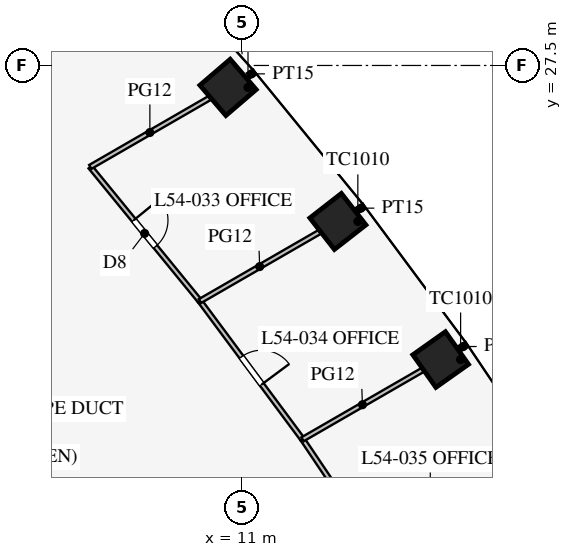
"""IFC4 building model, lengths in metres.
Left out: names, types, materials, properties, quantities, classifications, styles, units other than length and angle.
Written with IfcOpenShell. Run it as: python <this file> out.ifc"""

import sys

from ifc_helpers import new_model, si_unit, direction, frame, frame_2d, origin, origin_2d, place, context, subcontext, project, spatial, rectangle, extrude, element, fill, save


model = new_model("IFC4")
c1 = context("Model", 3, precision=1e-05, world=origin(), true_north=direction((0.0, 1.0)))
c2 = subcontext(c1, "Body", "Model", "MODEL_VIEW")
j1 = project(units=[si_unit("LENGTHUNIT", "METRE"), si_unit("PLANEANGLEUNIT", "RADIAN")], contexts=[c1])
p1 = place(None, origin())
s1 = spatial("IfcSite", under=j1, at=p1, CompositionType="ELEMENT")
p2 = place(p1, origin())
s2 = spatial("IfcBuilding", under=s1, at=p2, CompositionType="ELEMENT")
p3 = place(p2, frame((0.0, 0.0, 235.9)))
s3 = spatial("IfcBuildingStorey", under=s2, at=p3, CompositionType="ELEMENT", Elevation=235.9)
for number, where, z_axis, x_axis in (
    (1, (16.227, 19.761, 0.0), (0.0, 0.0, 1.0), (-0.577, 0.816, 0.0)),
    (2, (13.522, 23.396, 0.0), (0.0, 0.0, 1.0), (-0.615, 0.789, 0.0)),
    (3, (10.632, 26.923, 0.0), (0.0, 0.0, 1.0), (-0.651, 0.759, 0.0)),
):
    element("IfcColumn", number, at=place(p3, frame(where, z_axis=z_axis, x_axis=x_axis)), inside=s3, PredefinedType="COLUMN", context=c2, shape_type="SweptSolid", body=[
        extrude(rectangle(XDim=1.05, YDim=1.05, at=origin_2d()), origin(), (0.0, 0.0, 1.0), 4.2),
    ])
p4 = place(p3, frame((14.039, 23.694, 0.0), z_axis=(0.0, 0.0, 1.0), x_axis=(0.866047486323, 0.49996174997, 0.0)))
e4 = element("IfcWall", 4, at=p4, inside=s3, PredefinedType="PARTITIONING", context=c2, shape_type="SweptSolid", body=[
    extrude(rectangle(XDim=0.206, YDim=0.15, at=frame_2d((0.103, 0.0))), origin(), (0.0, 0.0, 1.0), 2.9),
])
p5 = place(p3, frame((11.166, 27.231, 0.0), z_axis=(0.0, 0.0, 1.0), x_axis=(0.866439280089, 0.499282459054, 0.0)))
e5 = element("IfcWall", 5, at=p5, inside=s3, PredefinedType="PARTITIONING", context=c2, shape_type="SweptSolid", body=[
    extrude(rectangle(XDim=0.192, YDim=0.15, at=frame_2d((0.096, 0.0))), origin(), (0.0, 0.0, 1.0), 2.9),
])
p6 = place(p3, frame((16.725, 20.048, 0.0), z_axis=(0.0, 0.0, 1.0), x_axis=(0.866149170119, 0.499785569122, 0.0)))
e6 = element("IfcWall", 6, at=p6, inside=s3, PredefinedType="PARTITIONING", context=c2, shape_type="SweptSolid", body=[
    extrude(rectangle(XDim=0.223, YDim=0.15, at=frame_2d((0.112, 0.0))), origin(), (0.0, 0.0, 1.0), 2.9),
])
p7 = place(p3, frame((9.892, 21.299, 0.0), z_axis=(0.0, 0.0, 1.0), x_axis=(-0.632765292047, 0.774343647989, 0.0)))
e7 = element("IfcWall", 7, at=p7, inside=s3, PredefinedType="PARTITIONING", context=c2, shape_type="SweptSolid", body=[
    extrude(rectangle(XDim=4.559, YDim=0.12, at=frame_2d((2.28, 0.0))), origin(), (0.0, 0.0, 1.0), 2.9),
])
p8 = place(p7, frame((1.85, 0.0, 0.15)))
e8 = element("IfcOpeningElement", 8, at=p8, cuts=e7, PredefinedType="OPENING", context=c2, shape_type="SweptSolid", body=[
    extrude(rectangle(XDim=0.9, YDim=2.1, at=frame_2d((0.45, 1.05))), frame((0.0, 0.07, 0.0), z_axis=(0.0, -1.0, 0.0), x_axis=(1.0, 0.0, 0.0)), (0.0, 0.0, 1.0), 0.14),
])
p9 = place(p3, frame((15.111, 13.921, 0.0), z_axis=(0.0, 0.0, 1.0), x_axis=(-0.558466624917, 0.829526991034, 0.0)))
e9 = element("IfcWall", 9, at=p9, inside=s3, PredefinedType="PARTITIONING", context=c2, shape_type="SweptSolid", body=[
    extrude(rectangle(XDim=4.511, YDim=0.12, at=frame_2d((2.255, 0.0))), origin(), (0.0, 0.0, 1.0), 2.9),
])
p10 = place(p9, frame((1.8, 0.0, 0.15)))
e10 = element("IfcOpeningElement", 10, at=p10, cuts=e9, PredefinedType="OPENING", context=c2, shape_type="SweptSolid", body=[
    extrude(rectangle(XDim=0.9, YDim=2.1, at=frame_2d((0.45, 1.05))), frame((0.0, 0.07, 0.0), z_axis=(0.0, -1.0, 0.0), x_axis=(1.0, 0.0, 0.0)), (0.0, 0.0, 1.0), 0.14),
])
p11 = place(p3, frame((12.592, 17.662, 0.0), z_axis=(0.0, 0.0, 1.0), x_axis=(-0.596173167565, 0.802855873912, 0.0)))
e11 = element("IfcWall", 11, at=p11, inside=s3, PredefinedType="PARTITIONING", context=c2, shape_type="SweptSolid", body=[
    extrude(rectangle(XDim=4.53, YDim=0.12, at=frame_2d((2.265, 0.0))), origin(), (0.0, 0.0, 1.0), 2.9),
])
p12 = place(p11, frame((1.8, 0.0, 0.15)))
e12 = element("IfcOpeningElement", 12, at=p12, cuts=e11, PredefinedType="OPENING", context=c2, shape_type="SweptSolid", body=[
    extrude(rectangle(XDim=0.9, YDim=2.1, at=frame_2d((0.45, 1.05))), frame((0.0, 0.07, 0.0), z_axis=(0.0, -1.0, 0.0), x_axis=(1.0, 0.0, 0.0)), (0.0, 0.0, 1.0), 0.14),
])
p13 = place(p3, frame((9.892, 21.299, 0.0), z_axis=(0.0, 0.0, 1.0), x_axis=(0.866013204505, 0.500021129177, 0.0)))
e13 = element("IfcWall", 13, at=p13, inside=s3, PredefinedType="PARTITIONING", context=c2, shape_type="SweptSolid", body=[
    extrude(rectangle(XDim=3.632, YDim=0.12, at=frame_2d((1.816, 0.0))), origin(), (0.0, 0.0, 1.0), 2.9),
])
p14 = place(p3, frame((7.007, 24.83, 0.0), z_axis=(0.0, 0.0, 1.0), x_axis=(0.866002603656, 0.500039488902, 0.0)))
e14 = element("IfcWall", 14, at=p14, inside=s3, PredefinedType="PARTITIONING", context=c2, shape_type="SweptSolid", body=[
    extrude(rectangle(XDim=3.622, YDim=0.12, at=frame_2d((1.811, 0.0))), origin(), (0.0, 0.0, 1.0), 2.9),
])
p15 = place(p3, frame((12.592, 17.662, 0.0), z_axis=(0.0, 0.0, 1.0), x_axis=(0.865996778659, 0.500049576894, 0.0)))
e15 = element("IfcWall", 15, at=p15, inside=s3, PredefinedType="PARTITIONING", context=c2, shape_type="SweptSolid", body=[
    extrude(rectangle(XDim=3.639, YDim=0.12, at=frame_2d((1.82, 0.0))), origin(), (0.0, 0.0, 1.0), 2.9),
])
p16 = place(p8, frame((0.9, 0.0, 0.0), z_axis=(0.0, 0.0, 1.0), x_axis=(-1.0, 0.0, 0.0)))
e16 = element("IfcDoor", 16, at=p16, inside=s3, OperationType="SINGLE_SWING_LEFT", PredefinedType="DOOR", context=c2, shape_type="SweptSolid", body=[
    extrude(rectangle(XDim=0.9, YDim=2.1, at=frame_2d((0.45, 1.05))), frame((0.0, 0.025, 0.0), z_axis=(0.0, -1.0, 0.0), x_axis=(1.0, 0.0, 0.0)), (0.0, 0.0, 1.0), 0.05),
])
fill(e8, e16)
p17 = place(p12, frame((0.9, 0.0, 0.0), z_axis=(0.0, 0.0, 1.0), x_axis=(-1.0, 0.0, 0.0)))
e17 = element("IfcDoor", 17, at=p17, inside=s3, OperationType="SINGLE_SWING_RIGHT", PredefinedType="DOOR", context=c2, shape_type="SweptSolid", body=[
    extrude(rectangle(XDim=0.9, YDim=2.1, at=frame_2d((0.45, 1.05))), frame((0.0, 0.025, 0.0), z_axis=(0.0, -1.0, 0.0), x_axis=(1.0, 0.0, 0.0)), (0.0, 0.0, 1.0), 0.05),
])
fill(e12, e17)
save(model, sys.argv[1])
